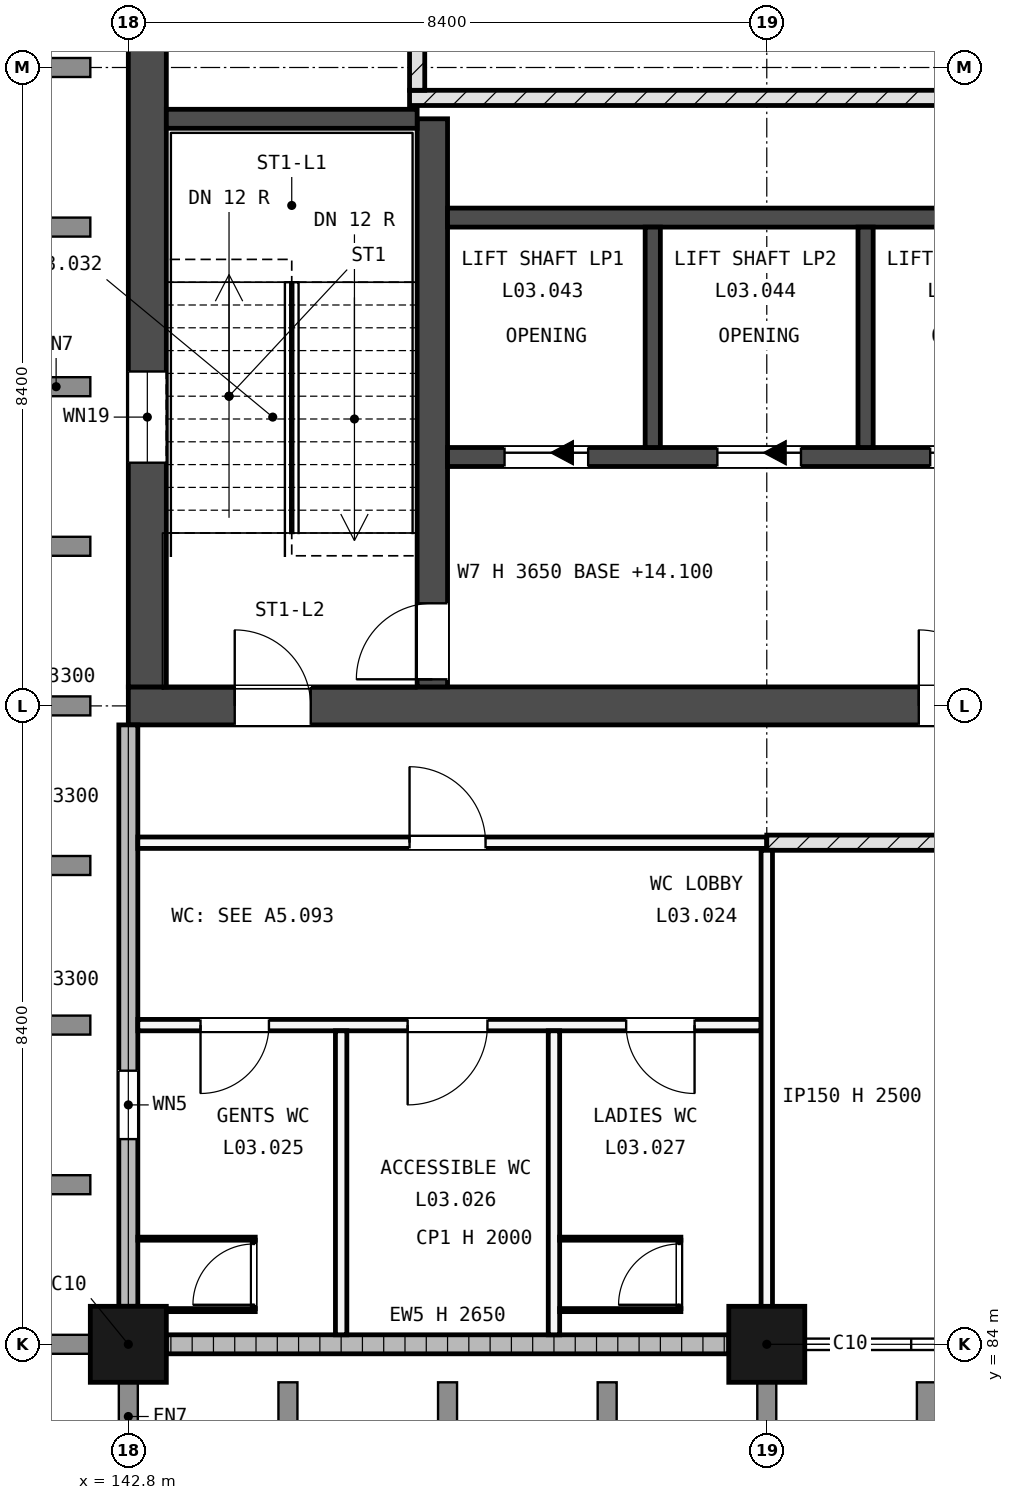
"""IFC4 building model, lengths in metres.
Left out: names, types, materials, properties, quantities, classifications, styles, units other than length and angle.
Written with IfcOpenShell. Run it as: python <this file> out.ifc"""

import sys

from ifc_helpers import new_model, si_unit, direction, frame, frame_2d, origin, origin_2d, place, context, subcontext, project, spatial, rectangle, extrude, element, fill, save


model = new_model("IFC4")
c1 = context("Model", 3, precision=1e-05, world=origin(), true_north=direction((0.0, 1.0)))
c2 = subcontext(c1, "Body", "Model", "MODEL_VIEW")
j1 = project(units=[si_unit("LENGTHUNIT", "METRE"), si_unit("PLANEANGLEUNIT", "RADIAN")], contexts=[c1])
p1 = place(None, origin())
s1 = spatial("IfcSite", under=j1, at=p1, CompositionType="ELEMENT")
p2 = place(p1, origin())
s2 = spatial("IfcBuilding", under=s1, at=p2, CompositionType="ELEMENT")
p3 = place(p2, frame((0.0, 0.0, 14.4)))
s3 = spatial("IfcBuildingStorey", under=s2, at=p3, CompositionType="ELEMENT", Elevation=14.4)
for number, where, z_axis, x_axis in (
    (1, (142.8, 84.0, -0.3), (0.0, 0.0, 1.0), (1.0, 0.0, 0.0)),
    (2, (151.2, 84.0, -0.3), (0.0, 0.0, 1.0), (1.0, 0.0, 0.0)),
):
    element("IfcColumn", number, at=place(p3, frame(where, z_axis=z_axis, x_axis=x_axis)), inside=s3, PredefinedType="COLUMN", context=c2, shape_type="SweptSolid", body=[
        extrude(rectangle(XDim=1.0, YDim=1.0, at=origin_2d()), origin(), (0.0, 0.0, 1.0), 3.65),
    ])
p4 = place(p3, frame((142.8, 92.4, -0.3), z_axis=(0.0, 0.0, 1.0), x_axis=(1.0, 0.0, 0.0)))
e3 = element("IfcWall", 3, at=p4, inside=s3, PredefinedType="SHEAR", context=c2, shape_type="SweptSolid", body=[
    extrude(rectangle(XDim=25.2, YDim=0.5, at=frame_2d((12.6, 0.0))), origin(), (0.0, 0.0, 1.0), 3.65),
])
p5 = place(p4, frame((1.4, 0.0, 0.3)))
e4 = element("IfcOpeningElement", 4, at=p5, cuts=e3, PredefinedType="OPENING", context=c2, shape_type="SweptSolid", body=[
    extrude(rectangle(XDim=1.0, YDim=2.1, at=frame_2d((0.5, 1.05))), frame((0.0, 0.26, 0.0), z_axis=(0.0, -1.0, 0.0), x_axis=(1.0, 0.0, 0.0)), (0.0, 0.0, 1.0), 0.52),
])
p6 = place(p4, frame((19.1, 0.0, 0.3)))
e5 = element("IfcOpeningElement", 5, at=p6, cuts=e3, PredefinedType="OPENING", context=c2, shape_type="SweptSolid", body=[
    extrude(rectangle(XDim=1.0, YDim=2.1, at=frame_2d((0.5, 1.05))), frame((0.0, 0.26, 0.0), z_axis=(0.0, -1.0, 0.0), x_axis=(1.0, 0.0, 0.0)), (0.0, 0.0, 1.0), 0.52),
])
p7 = place(p4, frame((10.4, 0.0, 0.3)))
e6 = element("IfcOpeningElement", 6, at=p7, cuts=e3, PredefinedType="OPENING", context=c2, shape_type="SweptSolid", body=[
    extrude(rectangle(XDim=1.0, YDim=2.1, at=frame_2d((0.5, 1.05))), frame((0.0, 0.26, 0.0), z_axis=(0.0, -1.0, 0.0), x_axis=(1.0, 0.0, 0.0)), (0.0, 0.0, 1.0), 0.52),
])
p8 = place(p3, frame((143.05, 92.65, -0.3), z_axis=(0.0, 0.0, 1.0), x_axis=(0.0, 1.0, 0.0)))
e7 = element("IfcWall", 7, at=p8, inside=s3, PredefinedType="SHEAR", context=c2, shape_type="SweptSolid", body=[
    extrude(rectangle(XDim=16.3, YDim=0.5, at=frame_2d((8.15, 0.0))), origin(), (0.0, 0.0, 1.0), 3.65),
])
p9 = place(p8, frame((2.95, 0.0, 1.9)))
e8 = element("IfcOpeningElement", 8, at=p9, cuts=e7, PredefinedType="OPENING", context=c2, shape_type="SweptSolid", body=[
    extrude(rectangle(XDim=1.2, YDim=0.9, at=frame_2d((0.6, 0.45))), frame((0.0, 0.26, 0.0), z_axis=(0.0, -1.0, 0.0), x_axis=(1.0, 0.0, 0.0)), (0.0, 0.0, 1.0), 0.52),
])
p10 = place(p3, frame((146.8, 92.65, -0.3), z_axis=(0.0, 0.0, 1.0), x_axis=(0.0, 1.0, 0.0)))
e9 = element("IfcWall", 9, at=p10, inside=s3, PredefinedType="SHEAR", context=c2, shape_type="SweptSolid", body=[
    extrude(rectangle(XDim=7.475, YDim=0.4, at=frame_2d((3.738, 0.0))), origin(), (0.0, 0.0, 1.0), 3.65),
])
p11 = place(p10, frame((0.1, 0.0, 0.3)))
e10 = element("IfcOpeningElement", 10, at=p11, cuts=e9, PredefinedType="OPENING", context=c2, shape_type="SweptSolid", body=[
    extrude(rectangle(XDim=1.0, YDim=2.1, at=frame_2d((0.5, 1.05))), frame((0.0, 0.21, 0.0), z_axis=(0.0, -1.0, 0.0), x_axis=(1.0, 0.0, 0.0)), (0.0, 0.0, 1.0), 0.42),
])
p12 = place(p3, frame((143.3, 100.125, -0.3), z_axis=(0.0, 0.0, 1.0), x_axis=(1.0, 0.0, 0.0)))
e11 = element("IfcWall", 11, at=p12, inside=s3, PredefinedType="SHEAR", context=c2, shape_type="SweptSolid", body=[
    extrude(rectangle(XDim=3.3, YDim=0.25, at=frame_2d((1.65, 0.0))), origin(), (0.0, 0.0, 1.0), 3.65),
])
p13 = place(p3, frame((147.0, 95.675, -0.3), z_axis=(0.0, 0.0, 1.0), x_axis=(1.0, 0.0, 0.0)))
e12 = element("IfcWall", 12, at=p13, inside=s3, PredefinedType="SHEAR", context=c2, shape_type="SweptSolid", body=[
    extrude(rectangle(XDim=11.25, YDim=0.25, at=frame_2d((5.625, 0.0))), origin(), (0.0, 0.0, 1.0), 3.65),
])
p14 = place(p13, frame((0.75, 0.0, 0.3)))
e13 = element("IfcOpeningElement", 13, at=p14, cuts=e12, PredefinedType="OPENING", context=c2, shape_type="SweptSolid", body=[
    extrude(rectangle(XDim=1.1, YDim=2.1, at=frame_2d((0.55, 1.05))), frame((0.0, 0.135, 0.0), z_axis=(0.0, -1.0, 0.0), x_axis=(1.0, 0.0, 0.0)), (0.0, 0.0, 1.0), 0.27),
])
p15 = place(p13, frame((3.55, 0.0, 0.3)))
e14 = element("IfcOpeningElement", 14, at=p15, cuts=e12, PredefinedType="OPENING", context=c2, shape_type="SweptSolid", body=[
    extrude(rectangle(XDim=1.1, YDim=2.1, at=frame_2d((0.55, 1.05))), frame((0.0, 0.135, 0.0), z_axis=(0.0, -1.0, 0.0), x_axis=(1.0, 0.0, 0.0)), (0.0, 0.0, 1.0), 0.27),
])
p16 = place(p13, frame((6.35, 0.0, 0.3)))
e15 = element("IfcOpeningElement", 15, at=p16, cuts=e12, PredefinedType="OPENING", context=c2, shape_type="SweptSolid", body=[
    extrude(rectangle(XDim=1.1, YDim=2.1, at=frame_2d((0.55, 1.05))), frame((0.0, 0.135, 0.0), z_axis=(0.0, -1.0, 0.0), x_axis=(1.0, 0.0, 0.0)), (0.0, 0.0, 1.0), 0.27),
])
p17 = place(p13, frame((9.15, 0.0, 0.3)))
e16 = element("IfcOpeningElement", 16, at=p17, cuts=e12, PredefinedType="OPENING", context=c2, shape_type="SweptSolid", body=[
    extrude(rectangle(XDim=1.1, YDim=2.1, at=frame_2d((0.55, 1.05))), frame((0.0, 0.135, 0.0), z_axis=(0.0, -1.0, 0.0), x_axis=(1.0, 0.0, 0.0)), (0.0, 0.0, 1.0), 0.27),
])
p18 = place(p3, frame((147.0, 98.825, -0.3), z_axis=(0.0, 0.0, 1.0), x_axis=(1.0, 0.0, 0.0)))
e17 = element("IfcWall", 17, at=p18, inside=s3, PredefinedType="SHEAR", context=c2, shape_type="SweptSolid", body=[
    extrude(rectangle(XDim=11.25, YDim=0.25, at=frame_2d((5.625, 0.0))), origin(), (0.0, 0.0, 1.0), 3.65),
])
for number, where, z_axis, x_axis in (
    (18, (149.7, 95.8, -0.3), (0.0, 0.0, 1.0), (0.0, 1.0, 0.0)),
    (19, (152.5, 95.8, -0.3), (0.0, 0.0, 1.0), (0.0, 1.0, 0.0)),
):
    element("IfcWall", number, at=place(p3, frame(where, z_axis=z_axis, x_axis=x_axis)), inside=s3, PredefinedType="SHEAR", context=c2, shape_type="SweptSolid", body=[
        extrude(rectangle(XDim=2.9, YDim=0.2, at=frame_2d((1.45, 0.0))), origin(), (0.0, 0.0, 1.0), 3.65),
    ])
p19 = place(p3, frame((143.3, 84.0, 0.0), z_axis=(0.0, 0.0, 1.0), x_axis=(1.0, 0.0, 0.0)))
e20 = element("IfcWall", 20, at=p19, inside=s3, PredefinedType="STANDARD", context=c2, shape_type="SweptSolid", body=[
    extrude(rectangle(XDim=7.4, YDim=0.25, at=frame_2d((3.7, 0.0))), origin(), (0.0, 0.0, 1.0), 2.65),
])
p20 = place(p3, frame((142.8, 84.5, 0.0), z_axis=(0.0, 0.0, 1.0), x_axis=(0.0, 1.0, 0.0)))
e21 = element("IfcWall", 21, at=p20, inside=s3, PredefinedType="STANDARD", context=c2, shape_type="SweptSolid", body=[
    extrude(rectangle(XDim=7.65, YDim=0.25, at=frame_2d((3.825, 0.0))), origin(), (0.0, 0.0, 1.0), 3.3),
])
p21 = place(p20, frame((2.2, 0.0, 2.1)))
e22 = element("IfcOpeningElement", 22, at=p21, cuts=e21, PredefinedType="OPENING", context=c2, shape_type="SweptSolid", body=[
    extrude(rectangle(XDim=0.9, YDim=0.6, at=frame_2d((0.45, 0.3))), frame((0.0, 0.135, 0.0), z_axis=(0.0, -1.0, 0.0), x_axis=(1.0, 0.0, 0.0)), (0.0, 0.0, 1.0), 0.27),
])
p22 = place(p3, frame((142.925, 88.2, 0.0), z_axis=(0.0, 0.0, 1.0), x_axis=(1.0, 0.0, 0.0)))
e23 = element("IfcWall", 23, at=p22, inside=s3, PredefinedType="PARTITIONING", context=c2, shape_type="SweptSolid", body=[
    extrude(rectangle(XDim=8.2, YDim=0.15, at=frame_2d((4.1, 0.0))), origin(), (0.0, 0.0, 1.0), 3.3),
])
p23 = place(p22, frame((0.825, 0.0, 0.0)))
e24 = element("IfcOpeningElement", 24, at=p23, cuts=e23, PredefinedType="OPENING", context=c2, shape_type="SweptSolid", body=[
    extrude(rectangle(XDim=0.9, YDim=2.1, at=frame_2d((0.45, 1.05))), frame((0.0, 0.085, 0.0), z_axis=(0.0, -1.0, 0.0), x_axis=(1.0, 0.0, 0.0)), (0.0, 0.0, 1.0), 0.17),
])
p24 = place(p22, frame((3.55, 0.0, 0.0)))
e25 = element("IfcOpeningElement", 25, at=p24, cuts=e23, PredefinedType="OPENING", context=c2, shape_type="SweptSolid", body=[
    extrude(rectangle(XDim=1.05, YDim=2.25, at=frame_2d((0.525, 1.125))), frame((0.0, 0.085, 0.0), z_axis=(0.0, -1.0, 0.0), x_axis=(1.0, 0.0, 0.0)), (0.0, 0.0, 1.0), 0.17),
])
p25 = place(p22, frame((6.425, 0.0, 0.0)))
e26 = element("IfcOpeningElement", 26, at=p25, cuts=e23, PredefinedType="OPENING", context=c2, shape_type="SweptSolid", body=[
    extrude(rectangle(XDim=0.9, YDim=2.1, at=frame_2d((0.45, 1.05))), frame((0.0, 0.085, 0.0), z_axis=(0.0, -1.0, 0.0), x_axis=(1.0, 0.0, 0.0)), (0.0, 0.0, 1.0), 0.17),
])
p26 = place(p3, frame((142.925, 90.6, 0.0), z_axis=(0.0, 0.0, 1.0), x_axis=(1.0, 0.0, 0.0)))
e27 = element("IfcWall", 27, at=p26, inside=s3, PredefinedType="PARTITIONING", context=c2, shape_type="SweptSolid", body=[
    extrude(rectangle(XDim=8.275, YDim=0.15, at=frame_2d((4.137, 0.0))), origin(), (0.0, 0.0, 1.0), 3.3),
])
p27 = place(p26, frame((3.575, 0.0, 0.0)))
e28 = element("IfcOpeningElement", 28, at=p27, cuts=e27, PredefinedType="OPENING", context=c2, shape_type="SweptSolid", body=[
    extrude(rectangle(XDim=1.0, YDim=2.1, at=frame_2d((0.5, 1.05))), frame((0.0, 0.085, 0.0), z_axis=(0.0, -1.0, 0.0), x_axis=(1.0, 0.0, 0.0)), (0.0, 0.0, 1.0), 0.17),
])
p28 = place(p3, frame((151.2, 90.6, 0.0), z_axis=(0.0, 0.0, 1.0), x_axis=(1.0, 0.0, 0.0)))
e29 = element("IfcWall", 29, at=p28, inside=s3, PredefinedType="SOLIDWALL", context=c2, shape_type="SweptSolid", body=[
    extrude(rectangle(XDim=16.8, YDim=0.2, at=frame_2d((8.4, 0.0))), origin(), (0.0, 0.0, 1.0), 3.3),
])
p29 = place(p28, frame((7.85, 0.0, 0.0)))
e30 = element("IfcOpeningElement", 30, at=p29, cuts=e29, PredefinedType="OPENING", context=c2, shape_type="SweptSolid", body=[
    extrude(rectangle(XDim=1.1, YDim=2.25, at=frame_2d((0.55, 1.125))), frame((0.0, 0.11, 0.0), z_axis=(0.0, -1.0, 0.0), x_axis=(1.0, 0.0, 0.0)), (0.0, 0.0, 1.0), 0.22),
])
p30 = place(p3, frame((146.5, 100.4, 0.0), z_axis=(0.0, 0.0, 1.0), x_axis=(1.0, 0.0, 0.0)))
e31 = element("IfcWall", 31, at=p30, inside=s3, PredefinedType="SOLIDWALL", context=c2, shape_type="SweptSolid", body=[
    extrude(rectangle(XDim=14.0, YDim=0.2, at=frame_2d((7.0, 0.0))), origin(), (0.0, 0.0, 1.0), 3.3),
])
p31 = place(p3, frame((145.6, 84.125, 0.0), z_axis=(0.0, 0.0, 1.0), x_axis=(0.0, 1.0, 0.0)))
e32 = element("IfcWall", 32, at=p31, inside=s3, PredefinedType="PARTITIONING", context=c2, shape_type="SweptSolid", body=[
    extrude(rectangle(XDim=4.0, YDim=0.15, at=frame_2d((2.0, 0.0))), origin(), (0.0, 0.0, 1.0), 3.3),
])
p32 = place(p3, frame((146.6, 100.5, 0.0), z_axis=(0.0, 0.0, 1.0), x_axis=(0.0, 1.0, 0.0)))
e33 = element("IfcWall", 33, at=p32, inside=s3, PredefinedType="SOLIDWALL", context=c2, shape_type="SweptSolid", body=[
    extrude(rectangle(XDim=5.3, YDim=0.2, at=frame_2d((2.65, 0.0))), origin(), (0.0, 0.0, 1.0), 3.3),
])
p33 = place(p32, frame((1.8, 0.0, 0.0)))
e34 = element("IfcOpeningElement", 34, at=p33, cuts=e33, PredefinedType="OPENING", context=c2, shape_type="SweptSolid", body=[
    extrude(rectangle(XDim=1.0, YDim=2.1, at=frame_2d((0.5, 1.05))), frame((0.0, 0.11, 0.0), z_axis=(0.0, -1.0, 0.0), x_axis=(1.0, 0.0, 0.0)), (0.0, 0.0, 1.0), 0.22),
])
p34 = place(p3, frame((148.4, 84.125, 0.0), z_axis=(0.0, 0.0, 1.0), x_axis=(0.0, 1.0, 0.0)))
e35 = element("IfcWall", 35, at=p34, inside=s3, PredefinedType="PARTITIONING", context=c2, shape_type="SweptSolid", body=[
    extrude(rectangle(XDim=4.0, YDim=0.15, at=frame_2d((2.0, 0.0))), origin(), (0.0, 0.0, 1.0), 3.3),
])
p35 = place(p3, frame((151.2, 84.0, 0.0), z_axis=(0.0, 0.0, 1.0), x_axis=(0.0, 1.0, 0.0)))
e36 = element("IfcWall", 36, at=p35, inside=s3, PredefinedType="PARTITIONING", context=c2, shape_type="SweptSolid", body=[
    extrude(rectangle(XDim=6.5, YDim=0.15, at=frame_2d((3.25, 0.0))), origin(), (0.0, 0.0, 1.0), 2.5),
])
p36 = place(p3, frame((142.93, 84.45, 0.0), z_axis=(0.0, 0.0, 1.0), x_axis=(1.0, 0.0, 0.0)))
e37 = element("IfcWall", 37, at=p36, inside=s3, PredefinedType="PARTITIONING", context=c2, shape_type="SweptSolid", body=[
    extrude(rectangle(XDim=1.54, YDim=0.04, at=frame_2d((0.77, 0.0))), origin(), (0.0, 0.0, 1.0), 2.0),
])
p37 = place(p3, frame((142.925, 85.39, 0.0), z_axis=(0.0, 0.0, 1.0), x_axis=(1.0, 0.0, 0.0)))
e38 = element("IfcWall", 38, at=p37, inside=s3, PredefinedType="PARTITIONING", context=c2, shape_type="SweptSolid", body=[
    extrude(rectangle(XDim=1.545, YDim=0.04, at=frame_2d((0.772, 0.0))), origin(), (0.0, 0.0, 1.0), 2.0),
])
p38 = place(p3, frame((144.45, 84.47, 0.0), z_axis=(0.0, 0.0, 1.0), x_axis=(0.0, 1.0, 0.0)))
e39 = element("IfcWall", 39, at=p38, inside=s3, PredefinedType="PARTITIONING", context=c2, shape_type="SweptSolid", body=[
    extrude(rectangle(XDim=0.9, YDim=0.04, at=frame_2d((0.45, 0.0))), origin(), (0.0, 0.0, 1.0), 2.0),
])
p39 = place(p38, frame((0.05, 0.0, 0.0)))
e40 = element("IfcOpeningElement", 40, at=p39, cuts=e39, PredefinedType="OPENING", context=c2, shape_type="SweptSolid", body=[
    extrude(rectangle(XDim=0.8, YDim=2.0, at=frame_2d((0.4, 1.0))), frame((0.0, 0.03, 0.0), z_axis=(0.0, -1.0, 0.0), x_axis=(1.0, 0.0, 0.0)), (0.0, 0.0, 1.0), 0.06),
])
for number, where, z_axis, x_axis in (
    (41, (148.475, 84.45, 0.0), (0.0, 0.0, 1.0), (1.0, 0.0, 0.0)),
    (42, (148.475, 85.39, 0.0), (0.0, 0.0, 1.0), (1.0, 0.0, 0.0)),
):
    element("IfcWall", number, at=place(p3, frame(where, z_axis=z_axis, x_axis=x_axis)), inside=s3, PredefinedType="PARTITIONING", context=c2, shape_type="SweptSolid", body=[
        extrude(rectangle(XDim=1.595, YDim=0.04, at=frame_2d((0.797, 0.0))), origin(), (0.0, 0.0, 1.0), 2.0),
    ])
p40 = place(p3, frame((150.05, 84.47, 0.0), z_axis=(0.0, 0.0, 1.0), x_axis=(0.0, 1.0, 0.0)))
e43 = element("IfcWall", 43, at=p40, inside=s3, PredefinedType="PARTITIONING", context=c2, shape_type="SweptSolid", body=[
    extrude(rectangle(XDim=0.9, YDim=0.04, at=frame_2d((0.45, 0.0))), origin(), (0.0, 0.0, 1.0), 2.0),
])
p41 = place(p40, frame((0.05, 0.0, 0.0)))
e44 = element("IfcOpeningElement", 44, at=p41, cuts=e43, PredefinedType="OPENING", context=c2, shape_type="SweptSolid", body=[
    extrude(rectangle(XDim=0.8, YDim=2.0, at=frame_2d((0.4, 1.0))), frame((0.0, 0.03, 0.0), z_axis=(0.0, -1.0, 0.0), x_axis=(1.0, 0.0, 0.0)), (0.0, 0.0, 1.0), 0.06),
])
p42 = place(p21, origin())
e45 = element("IfcWindow", 45, at=p42, inside=s3, PartitioningType="SINGLE_PANEL", PredefinedType="WINDOW", context=c2, shape_type="SweptSolid", body=[
    extrude(rectangle(XDim=0.9, YDim=0.6, at=frame_2d((0.45, 0.3))), frame((0.0, 0.03, 0.0), z_axis=(0.0, -1.0, 0.0), x_axis=(1.0, 0.0, 0.0)), (0.0, 0.0, 1.0), 0.06),
])
fill(e22, e45)
p43 = place(p9, origin())
e46 = element("IfcWindow", 46, at=p43, inside=s3, PartitioningType="SINGLE_PANEL", PredefinedType="WINDOW", context=c2, shape_type="SweptSolid", body=[
    extrude(rectangle(XDim=1.2, YDim=0.9, at=frame_2d((0.6, 0.45))), frame((0.0, 0.03, 0.0), z_axis=(0.0, -1.0, 0.0), x_axis=(1.0, 0.0, 0.0)), (0.0, 0.0, 1.0), 0.06),
])
fill(e8, e46)
p44 = place(p14, origin())
e47 = element("IfcDoor", 47, at=p44, inside=s3, OperationType="SLIDING_TO_LEFT", PredefinedType="DOOR", context=c2, shape_type="SweptSolid", body=[
    extrude(rectangle(XDim=1.1, YDim=2.1, at=frame_2d((0.55, 1.05))), frame((0.0, 0.025, 0.0), z_axis=(0.0, -1.0, 0.0), x_axis=(1.0, 0.0, 0.0)), (0.0, 0.0, 1.0), 0.05),
])
fill(e13, e47)
p45 = place(p15, origin())
e48 = element("IfcDoor", 48, at=p45, inside=s3, OperationType="SLIDING_TO_LEFT", PredefinedType="DOOR", context=c2, shape_type="SweptSolid", body=[
    extrude(rectangle(XDim=1.1, YDim=2.1, at=frame_2d((0.55, 1.05))), frame((0.0, 0.025, 0.0), z_axis=(0.0, -1.0, 0.0), x_axis=(1.0, 0.0, 0.0)), (0.0, 0.0, 1.0), 0.05),
])
fill(e14, e48)
p46 = place(p16, origin())
e49 = element("IfcDoor", 49, at=p46, inside=s3, OperationType="SLIDING_TO_LEFT", PredefinedType="DOOR", context=c2, shape_type="SweptSolid", body=[
    extrude(rectangle(XDim=1.1, YDim=2.1, at=frame_2d((0.55, 1.05))), frame((0.0, 0.025, 0.0), z_axis=(0.0, -1.0, 0.0), x_axis=(1.0, 0.0, 0.0)), (0.0, 0.0, 1.0), 0.05),
])
fill(e15, e49)
p47 = place(p5, origin())
e50 = element("IfcDoor", 50, at=p47, inside=s3, OperationType="SINGLE_SWING_RIGHT", PredefinedType="DOOR", context=c2, shape_type="SweptSolid", body=[
    extrude(rectangle(XDim=1.0, YDim=2.1, at=frame_2d((0.5, 1.05))), frame((0.0, 0.025, 0.0), z_axis=(0.0, -1.0, 0.0), x_axis=(1.0, 0.0, 0.0)), (0.0, 0.0, 1.0), 0.05),
])
fill(e4, e50)
p48 = place(p11, origin())
e51 = element("IfcDoor", 51, at=p48, inside=s3, OperationType="SINGLE_SWING_RIGHT", PredefinedType="DOOR", context=c2, shape_type="SweptSolid", body=[
    extrude(rectangle(XDim=1.0, YDim=2.1, at=frame_2d((0.5, 1.05))), frame((0.0, 0.025, 0.0), z_axis=(0.0, -1.0, 0.0), x_axis=(1.0, 0.0, 0.0)), (0.0, 0.0, 1.0), 0.05),
])
fill(e10, e51)
p49 = place(p23, origin())
e52 = element("IfcDoor", 52, at=p49, inside=s3, OperationType="SINGLE_SWING_LEFT", PredefinedType="DOOR", context=c2, shape_type="SweptSolid", body=[
    extrude(rectangle(XDim=0.9, YDim=2.1, at=frame_2d((0.45, 1.05))), frame((0.0, 0.025, 0.0), z_axis=(0.0, -1.0, 0.0), x_axis=(1.0, 0.0, 0.0)), (0.0, 0.0, 1.0), 0.05),
])
fill(e24, e52)
p50 = place(p24, origin())
e53 = element("IfcDoor", 53, at=p50, inside=s3, OperationType="SINGLE_SWING_LEFT", PredefinedType="DOOR", context=c2, shape_type="SweptSolid", body=[
    extrude(rectangle(XDim=1.05, YDim=2.25, at=frame_2d((0.525, 1.125))), frame((0.0, 0.025, 0.0), z_axis=(0.0, -1.0, 0.0), x_axis=(1.0, 0.0, 0.0)), (0.0, 0.0, 1.0), 0.05),
])
fill(e25, e53)
p51 = place(p25, origin())
e54 = element("IfcDoor", 54, at=p51, inside=s3, OperationType="SINGLE_SWING_RIGHT", PredefinedType="DOOR", context=c2, shape_type="SweptSolid", body=[
    extrude(rectangle(XDim=0.9, YDim=2.1, at=frame_2d((0.45, 1.05))), frame((0.0, 0.025, 0.0), z_axis=(0.0, -1.0, 0.0), x_axis=(1.0, 0.0, 0.0)), (0.0, 0.0, 1.0), 0.05),
])
fill(e26, e54)
p52 = place(p27, origin())
e55 = element("IfcDoor", 55, at=p52, inside=s3, OperationType="SINGLE_SWING_RIGHT", PredefinedType="DOOR", context=c2, shape_type="SweptSolid", body=[
    extrude(rectangle(XDim=1.0, YDim=2.1, at=frame_2d((0.5, 1.05))), frame((0.0, 0.025, 0.0), z_axis=(0.0, -1.0, 0.0), x_axis=(1.0, 0.0, 0.0)), (0.0, 0.0, 1.0), 0.05),
])
fill(e28, e55)
p53 = place(p7, origin())
e56 = element("IfcDoor", 56, at=p53, inside=s3, OperationType="SINGLE_SWING_RIGHT", PredefinedType="DOOR", context=c2, shape_type="SweptSolid", body=[
    extrude(rectangle(XDim=1.0, YDim=2.1, at=frame_2d((0.5, 1.05))), frame((0.0, 0.025, 0.0), z_axis=(0.0, -1.0, 0.0), x_axis=(1.0, 0.0, 0.0)), (0.0, 0.0, 1.0), 0.05),
])
fill(e6, e56)
p54 = place(p39, origin())
e57 = element("IfcDoor", 57, at=p54, inside=s3, OperationType="SINGLE_SWING_LEFT", PredefinedType="DOOR", context=c2, shape_type="SweptSolid", body=[
    extrude(rectangle(XDim=0.8, YDim=2.0, at=frame_2d((0.4, 1.0))), frame((0.0, 0.02, 0.0), z_axis=(0.0, -1.0, 0.0), x_axis=(1.0, 0.0, 0.0)), (0.0, 0.0, 1.0), 0.04),
])
fill(e40, e57)
p55 = place(p41, origin())
e58 = element("IfcDoor", 58, at=p55, inside=s3, OperationType="SINGLE_SWING_LEFT", PredefinedType="DOOR", context=c2, shape_type="SweptSolid", body=[
    extrude(rectangle(XDim=0.8, YDim=2.0, at=frame_2d((0.4, 1.0))), frame((0.0, 0.02, 0.0), z_axis=(0.0, -1.0, 0.0), x_axis=(1.0, 0.0, 0.0)), (0.0, 0.0, 1.0), 0.04),
])
fill(e44, e58)
save(model, sys.argv[1])
